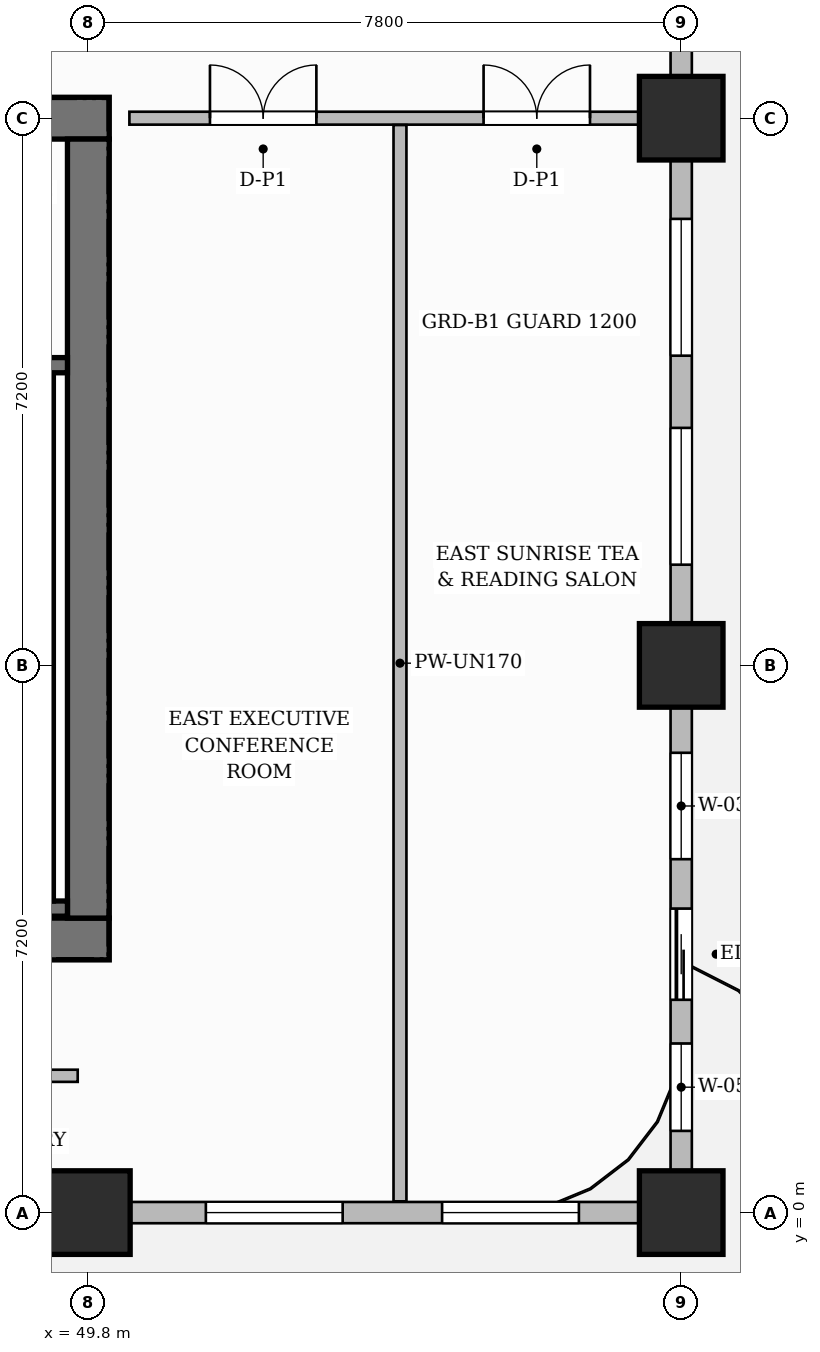
"""IFC4 building model, lengths in metres.
Left out: names, types, materials, properties, quantities, classifications, styles, units other than length and angle.
Written with IfcOpenShell. Run it as: python <this file> out.ifc"""

import sys

from ifc_helpers import new_model, si_unit, direction, frame, frame_2d, origin, origin_2d, place, context, subcontext, project, spatial, rectangle, extrude, source, transform, mapped, element, fill, save


model = new_model("IFC4")
c1 = context("Model", 3, precision=1e-05, world=origin(), true_north=direction((0.0, 1.0)))
c2 = subcontext(c1, "Body", "Model", "MODEL_VIEW")
j1 = project(units=[si_unit("LENGTHUNIT", "METRE"), si_unit("PLANEANGLEUNIT", "RADIAN")], contexts=[c1])
p1 = place(None, origin())
s1 = spatial("IfcSite", under=j1, at=p1, CompositionType="ELEMENT")
p2 = place(p1, origin())
s2 = spatial("IfcBuilding", under=s1, at=p2, CompositionType="ELEMENT")
p3 = place(p2, frame((0.0, 0.0, 65.7)))
s3 = spatial("IfcBuildingStorey", under=s2, at=p3, CompositionType="ELEMENT", Elevation=65.7)
p4 = place(p3, frame((34.525, 3.6, 0.0), z_axis=(0.0, 0.0, 1.0), x_axis=(1.0, 0.0, 0.0)))
e1 = element("IfcWall", 1, at=p4, inside=s3, PredefinedType="SHEAR", context=c2, shape_type="SweptSolid", body=[
    extrude(rectangle(XDim=15.55, YDim=0.55, at=frame_2d((7.775, 0.0))), origin(), (0.0, 0.0, 1.0), 3.7),
])
p5 = place(p4, frame((4.105, 0.0, 0.0)))
e2 = element("IfcOpeningElement", 2, at=p5, cuts=e1, PredefinedType="OPENING", context=c2, shape_type="SweptSolid", body=[
    extrude(rectangle(XDim=0.9, YDim=2.1, at=frame_2d((0.45, 1.05))), frame((0.0, 0.285, 0.0), z_axis=(0.0, -1.0, 0.0), x_axis=(1.0, 0.0, 0.0)), (0.0, 0.0, 1.0), 0.57),
])
p6 = place(p4, frame((5.675, 0.0, 0.0)))
e3 = element("IfcOpeningElement", 3, at=p6, cuts=e1, PredefinedType="OPENING", context=c2, shape_type="SweptSolid", body=[
    extrude(rectangle(XDim=0.9, YDim=2.1, at=frame_2d((0.45, 1.05))), frame((0.0, 0.285, 0.0), z_axis=(0.0, -1.0, 0.0), x_axis=(1.0, 0.0, 0.0)), (0.0, 0.0, 1.0), 0.57),
])
p7 = place(p4, frame((7.275, 0.0, 0.0)))
e4 = element("IfcOpeningElement", 4, at=p7, cuts=e1, PredefinedType="OPENING", context=c2, shape_type="SweptSolid", body=[
    extrude(rectangle(XDim=0.9, YDim=2.1, at=frame_2d((0.45, 1.05))), frame((0.0, 0.285, 0.0), z_axis=(0.0, -1.0, 0.0), x_axis=(1.0, 0.0, 0.0)), (0.0, 0.0, 1.0), 0.57),
])
p8 = place(p3, frame((34.525, 14.4, 0.0), z_axis=(0.0, 0.0, 1.0), x_axis=(1.0, 0.0, 0.0)))
e5 = element("IfcWall", 5, at=p8, inside=s3, PredefinedType="SHEAR", context=c2, shape_type="SweptSolid", body=[
    extrude(rectangle(XDim=15.55, YDim=0.55, at=frame_2d((7.775, 0.0))), origin(), (0.0, 0.0, 1.0), 3.7),
])
p9 = place(p8, frame((5.405, 0.0, 0.0)))
e6 = element("IfcOpeningElement", 6, at=p9, cuts=e5, PredefinedType="OPENING", context=c2, shape_type="SweptSolid", body=[
    extrude(rectangle(XDim=1.5, YDim=2.2, at=frame_2d((0.75, 1.1))), frame((0.0, 0.285, 0.0), z_axis=(0.0, -1.0, 0.0), x_axis=(1.0, 0.0, 0.0)), (0.0, 0.0, 1.0), 0.57),
])
p10 = place(p8, frame((1.62, 0.0, 0.0)))
e7 = element("IfcOpeningElement", 7, at=p10, cuts=e5, PredefinedType="OPENING", context=c2, shape_type="SweptSolid", body=[
    extrude(rectangle(XDim=1.05, YDim=2.15, at=frame_2d((0.525, 1.075))), frame((0.0, 0.285, 0.0), z_axis=(0.0, -1.0, 0.0), x_axis=(1.0, 0.0, 0.0)), (0.0, 0.0, 1.0), 0.57),
])
p11 = place(p8, frame((11.25, 0.0, 0.0)))
e8 = element("IfcOpeningElement", 8, at=p11, cuts=e5, PredefinedType="OPENING", context=c2, shape_type="SweptSolid", body=[
    extrude(rectangle(XDim=1.05, YDim=2.15, at=frame_2d((0.525, 1.075))), frame((0.0, 0.285, 0.0), z_axis=(0.0, -1.0, 0.0), x_axis=(1.0, 0.0, 0.0)), (0.0, 0.0, 1.0), 0.57),
])
p12 = place(p3, frame((49.8, 3.875, 0.0), z_axis=(0.0, 0.0, 1.0), x_axis=(0.0, 1.0, 0.0)))
e9 = element("IfcWall", 9, at=p12, inside=s3, PredefinedType="SHEAR", context=c2, shape_type="SweptSolid", body=[
    extrude(rectangle(XDim=10.25, YDim=0.55, at=frame_2d((5.125, 0.0))), origin(), (0.0, 0.0, 1.0), 3.7),
])
m1 = source(origin(), c2, "Body", "SweptSolid", [
    extrude(rectangle(XDim=1.1, YDim=1.1, at=origin_2d()), origin(), (0.0, 0.0, 1.0), 3.7),
])
for number, where, z_axis, x_axis in (
    (10, (49.8, 0.0, 0.0), (0.0, 0.0, 1.0), (1.0, 0.0, 0.0)),
    (11, (57.6, 0.0, 0.0), (0.0, 0.0, 1.0), (1.0, 0.0, 0.0)),
    (12, (57.6, 7.2, 0.0), (0.0, 0.0, 1.0), (1.0, 0.0, 0.0)),
    (13, (57.6, 14.4, 0.0), (0.0, 0.0, 1.0), (1.0, 0.0, 0.0)),
):
    element("IfcColumn", number, at=place(p3, frame(where, z_axis=z_axis, x_axis=x_axis)), inside=s3, PredefinedType="COLUMN", context=c2, shape_type="MappedRepresentation", body=[
        mapped(m1, transform((0.0, 0.0, 0.0), scale=1.0)),
    ])
p13 = place(p3, frame((43.12, 4.0, 0.0), z_axis=(0.0, 0.0, 1.0), x_axis=(1.0, 0.0, 0.0)))
e14 = element("IfcWall", 14, at=p13, inside=s3, PredefinedType="SHEAR", context=c2, shape_type="SweptSolid", body=[
    extrude(rectangle(XDim=6.405, YDim=0.2, at=frame_2d((3.202, 0.0))), origin(), (0.0, 0.0, 1.0), 3.7),
])
p14 = place(p3, frame((49.24, 4.1, 0.0), z_axis=(0.0, 0.0, 1.0), x_axis=(0.0, 1.0, 0.0)))
e15 = element("IfcWall", 15, at=p14, inside=s3, PredefinedType="SHEAR", context=c2, shape_type="SweptSolid", body=[
    extrude(rectangle(XDim=6.95, YDim=0.2, at=frame_2d((3.475, 0.0))), origin(), (0.0, 0.0, 1.0), 3.7),
])
p15 = place(p3, frame((43.12, 11.15, 0.0), z_axis=(0.0, 0.0, 1.0), x_axis=(1.0, 0.0, 0.0)))
e16 = element("IfcWall", 16, at=p15, inside=s3, PredefinedType="SHEAR", context=c2, shape_type="SweptSolid", body=[
    extrude(rectangle(XDim=6.405, YDim=0.2, at=frame_2d((3.202, 0.0))), origin(), (0.0, 0.0, 1.0), 3.7),
])
p16 = place(p15, frame((1.045, 0.0, 0.0)))
e17 = element("IfcOpeningElement", 17, at=p16, cuts=e16, PredefinedType="OPENING", context=c2, shape_type="SweptSolid", body=[
    extrude(rectangle(XDim=1.05, YDim=2.2, at=frame_2d((0.525, 1.1))), frame((0.0, 0.11, 0.0), z_axis=(0.0, -1.0, 0.0), x_axis=(1.0, 0.0, 0.0)), (0.0, 0.0, 1.0), 0.22),
])
p17 = place(p15, frame((4.125, 0.0, 0.0)))
e18 = element("IfcOpeningElement", 18, at=p17, cuts=e16, PredefinedType="OPENING", context=c2, shape_type="SweptSolid", body=[
    extrude(rectangle(XDim=1.05, YDim=2.2, at=frame_2d((0.525, 1.1))), frame((0.0, 0.11, 0.0), z_axis=(0.0, -1.0, 0.0), x_axis=(1.0, 0.0, 0.0)), (0.0, 0.0, 1.0), 0.22),
])
p18 = place(p3, frame((30.29, 1.8, 0.0), z_axis=(0.0, 0.0, 1.0), x_axis=(1.0, 0.0, 0.0)))
e19 = element("IfcWall", 19, at=p18, inside=s3, PredefinedType="PARTITIONING", context=c2, shape_type="SweptSolid", body=[
    extrude(rectangle(XDim=19.37, YDim=0.16, at=frame_2d((9.685, 0.0))), origin(), (0.0, 0.0, 1.0), 3.45),
])
p19 = place(p18, frame((5.213, 0.0, 0.0)))
e20 = element("IfcOpeningElement", 20, at=p19, cuts=e19, PredefinedType="OPENING", context=c2, shape_type="SweptSolid", body=[
    extrude(rectangle(XDim=0.9, YDim=2.15, at=frame_2d((0.45, 1.075))), frame((0.0, 0.09, 0.0), z_axis=(0.0, -1.0, 0.0), x_axis=(1.0, 0.0, 0.0)), (0.0, 0.0, 1.0), 0.18),
])
p20 = place(p18, frame((14.06, 0.0, 0.0)))
e21 = element("IfcOpeningElement", 21, at=p20, cuts=e19, PredefinedType="OPENING", context=c2, shape_type="SweptSolid", body=[
    extrude(rectangle(XDim=0.9, YDim=2.15, at=frame_2d((0.45, 1.075))), frame((0.0, 0.09, 0.0), z_axis=(0.0, -1.0, 0.0), x_axis=(1.0, 0.0, 0.0)), (0.0, 0.0, 1.0), 0.18),
])
p21 = place(p3, frame((50.34, 14.4, 0.0), z_axis=(0.0, 0.0, 1.0), x_axis=(1.0, 0.0, 0.0)))
e22 = element("IfcWall", 22, at=p21, inside=s3, PredefinedType="PARTITIONING", context=c2, shape_type="SweptSolid", body=[
    extrude(rectangle(XDim=7.07, YDim=0.17, at=frame_2d((3.535, 0.0))), origin(), (0.0, 0.0, 1.0), 2.885),
])
p22 = place(p21, frame((1.06, 0.0, 0.0)))
e23 = element("IfcOpeningElement", 23, at=p22, cuts=e22, PredefinedType="OPENING", context=c2, shape_type="SweptSolid", body=[
    extrude(rectangle(XDim=1.4, YDim=2.35, at=frame_2d((0.7, 1.175))), frame((0.0, 0.095, 0.0), z_axis=(0.0, -1.0, 0.0), x_axis=(1.0, 0.0, 0.0)), (0.0, 0.0, 1.0), 0.19),
])
p23 = place(p21, frame((4.66, 0.0, 0.0)))
e24 = element("IfcOpeningElement", 24, at=p23, cuts=e22, PredefinedType="OPENING", context=c2, shape_type="SweptSolid", body=[
    extrude(rectangle(XDim=1.4, YDim=2.35, at=frame_2d((0.7, 1.175))), frame((0.0, 0.095, 0.0), z_axis=(0.0, -1.0, 0.0), x_axis=(1.0, 0.0, 0.0)), (0.0, 0.0, 1.0), 0.19),
])
p24 = place(p3, frame((53.9, 0.148, 0.0), z_axis=(0.0, 0.0, 1.0), x_axis=(0.0, 1.0, 0.0)))
e25 = element("IfcWall", 25, at=p24, inside=s3, PredefinedType="PARTITIONING", context=c2, shape_type="SweptSolid", body=[
    extrude(rectangle(XDim=14.162, YDim=0.17, at=frame_2d((7.081, 0.0))), origin(), (0.0, 0.0, 1.0), 3.035),
])
p25 = place(p3, frame((14.4, 0.0, 0.0), z_axis=(0.0, 0.0, 1.0), x_axis=(1.0, 0.0, 0.0)))
e26 = element("IfcWall", 26, at=p25, inside=s3, PredefinedType="SOLIDWALL", context=c2, shape_type="SweptSolid", body=[
    extrude(rectangle(XDim=43.2, YDim=0.28, at=frame_2d((21.6, 0.0))), origin(), (0.0, 0.0, 1.0), 2.885),
])
p26 = place(p25, frame((0.85, 0.0, 0.0)))
e27 = element("IfcOpeningElement", 27, at=p26, cuts=e26, PredefinedType="OPENING", context=c2, shape_type="SweptSolid", body=[
    extrude(rectangle(XDim=1.2, YDim=2.2, at=frame_2d((0.6, 1.1))), frame((0.0, 0.15, 0.0), z_axis=(0.0, -1.0, 0.0), x_axis=(1.0, 0.0, 0.0)), (0.0, 0.0, 1.0), 0.3),
])
p27 = place(p25, frame((2.671, 0.0, 0.8)))
e28 = element("IfcOpeningElement", 28, at=p27, cuts=e26, PredefinedType="OPENING", context=c2, shape_type="SweptSolid", body=[
    extrude(rectangle(XDim=0.95, YDim=1.75, at=frame_2d((0.475, 0.875))), frame((0.0, 0.15, 0.0), z_axis=(0.0, -1.0, 0.0), x_axis=(1.0, 0.0, 0.0)), (0.0, 0.0, 1.0), 0.3),
])
p28 = place(p25, frame((4.479, 0.0, 0.8)))
e29 = element("IfcOpeningElement", 29, at=p28, cuts=e26, PredefinedType="OPENING", context=c2, shape_type="SweptSolid", body=[
    extrude(rectangle(XDim=1.4, YDim=1.85, at=frame_2d((0.7, 0.925))), frame((0.0, 0.15, 0.0), z_axis=(0.0, -1.0, 0.0), x_axis=(1.0, 0.0, 0.0)), (0.0, 0.0, 1.0), 0.3),
])
p29 = place(p25, frame((8.181, 0.0, 0.8)))
e30 = element("IfcOpeningElement", 30, at=p29, cuts=e26, PredefinedType="OPENING", context=c2, shape_type="SweptSolid", body=[
    extrude(rectangle(XDim=0.95, YDim=1.75, at=frame_2d((0.475, 0.875))), frame((0.0, 0.15, 0.0), z_axis=(0.0, -1.0, 0.0), x_axis=(1.0, 0.0, 0.0)), (0.0, 0.0, 1.0), 0.3),
])
p30 = place(p25, frame((9.845, 0.0, 0.8)))
e31 = element("IfcOpeningElement", 31, at=p30, cuts=e26, PredefinedType="OPENING", context=c2, shape_type="SweptSolid", body=[
    extrude(rectangle(XDim=1.8, YDim=1.85, at=frame_2d((0.9, 0.925))), frame((0.0, 0.15, 0.0), z_axis=(0.0, -1.0, 0.0), x_axis=(1.0, 0.0, 0.0)), (0.0, 0.0, 1.0), 0.3),
])
p31 = place(p25, frame((12.414, 0.0, 0.8)))
e32 = element("IfcOpeningElement", 32, at=p31, cuts=e26, PredefinedType="OPENING", context=c2, shape_type="SweptSolid", body=[
    extrude(rectangle(XDim=0.95, YDim=1.75, at=frame_2d((0.475, 0.875))), frame((0.0, 0.15, 0.0), z_axis=(0.0, -1.0, 0.0), x_axis=(1.0, 0.0, 0.0)), (0.0, 0.0, 1.0), 0.3),
])
p32 = place(p25, frame((16.804, 0.0, 0.8)))
e33 = element("IfcOpeningElement", 33, at=p32, cuts=e26, PredefinedType="OPENING", context=c2, shape_type="SweptSolid", body=[
    extrude(rectangle(XDim=1.8, YDim=1.85, at=frame_2d((0.9, 0.925))), frame((0.0, 0.15, 0.0), z_axis=(0.0, -1.0, 0.0), x_axis=(1.0, 0.0, 0.0)), (0.0, 0.0, 1.0), 0.3),
])
p33 = place(p25, frame((22.396, 0.0, 0.8)))
e34 = element("IfcOpeningElement", 34, at=p33, cuts=e26, PredefinedType="OPENING", context=c2, shape_type="SweptSolid", body=[
    extrude(rectangle(XDim=1.8, YDim=1.85, at=frame_2d((0.9, 0.925))), frame((0.0, 0.15, 0.0), z_axis=(0.0, -1.0, 0.0), x_axis=(1.0, 0.0, 0.0)), (0.0, 0.0, 1.0), 0.3),
])
p34 = place(p25, frame((25.629, 0.0, 0.8)))
e35 = element("IfcOpeningElement", 35, at=p34, cuts=e26, PredefinedType="OPENING", context=c2, shape_type="SweptSolid", body=[
    extrude(rectangle(XDim=0.95, YDim=1.75, at=frame_2d((0.475, 0.875))), frame((0.0, 0.15, 0.0), z_axis=(0.0, -1.0, 0.0), x_axis=(1.0, 0.0, 0.0)), (0.0, 0.0, 1.0), 0.3),
])
p35 = place(p25, frame((29.075, 0.0, 0.8)))
e36 = element("IfcOpeningElement", 36, at=p35, cuts=e26, PredefinedType="OPENING", context=c2, shape_type="SweptSolid", body=[
    extrude(rectangle(XDim=1.8, YDim=1.85, at=frame_2d((0.9, 0.925))), frame((0.0, 0.15, 0.0), z_axis=(0.0, -1.0, 0.0), x_axis=(1.0, 0.0, 0.0)), (0.0, 0.0, 1.0), 0.3),
])
p36 = place(p25, frame((32.125, 0.0, 0.8)))
e37 = element("IfcOpeningElement", 37, at=p36, cuts=e26, PredefinedType="OPENING", context=c2, shape_type="SweptSolid", body=[
    extrude(rectangle(XDim=1.8, YDim=1.85, at=frame_2d((0.9, 0.925))), frame((0.0, 0.15, 0.0), z_axis=(0.0, -1.0, 0.0), x_axis=(1.0, 0.0, 0.0)), (0.0, 0.0, 1.0), 0.3),
])
p37 = place(p25, frame((36.946, 0.0, 0.8)))
e38 = element("IfcOpeningElement", 38, at=p37, cuts=e26, PredefinedType="OPENING", context=c2, shape_type="SweptSolid", body=[
    extrude(rectangle(XDim=1.8, YDim=1.85, at=frame_2d((0.9, 0.925))), frame((0.0, 0.15, 0.0), z_axis=(0.0, -1.0, 0.0), x_axis=(1.0, 0.0, 0.0)), (0.0, 0.0, 1.0), 0.3),
])
p38 = place(p25, frame((40.054, 0.0, 0.8)))
e39 = element("IfcOpeningElement", 39, at=p38, cuts=e26, PredefinedType="OPENING", context=c2, shape_type="SweptSolid", body=[
    extrude(rectangle(XDim=1.8, YDim=1.85, at=frame_2d((0.9, 0.925))), frame((0.0, 0.15, 0.0), z_axis=(0.0, -1.0, 0.0), x_axis=(1.0, 0.0, 0.0)), (0.0, 0.0, 1.0), 0.3),
])
p39 = place(p3, frame((57.6, 0.05, 0.0), z_axis=(0.0, 0.0, 1.0), x_axis=(0.0, 1.0, 0.0)))
e40 = element("IfcWall", 40, at=p39, inside=s3, PredefinedType="SOLIDWALL", context=c2, shape_type="SweptSolid", body=[
    extrude(rectangle(XDim=21.5, YDim=0.28, at=frame_2d((10.75, 0.0))), origin(), (0.0, 0.0, 1.0), 2.885),
])
p40 = place(p39, frame((2.75, 0.0, 0.0)))
e41 = element("IfcOpeningElement", 41, at=p40, cuts=e40, PredefinedType="OPENING", context=c2, shape_type="SweptSolid", body=[
    extrude(rectangle(XDim=1.2, YDim=2.2, at=frame_2d((0.6, 1.1))), frame((0.0, 0.15, 0.0), z_axis=(0.0, -1.0, 0.0), x_axis=(1.0, 0.0, 0.0)), (0.0, 0.0, 1.0), 0.3),
])
p41 = place(p39, frame((1.025, 0.0, 0.8)))
e42 = element("IfcOpeningElement", 42, at=p41, cuts=e40, PredefinedType="OPENING", context=c2, shape_type="SweptSolid", body=[
    extrude(rectangle(XDim=1.15, YDim=1.8, at=frame_2d((0.575, 0.9))), frame((0.0, 0.15, 0.0), z_axis=(0.0, -1.0, 0.0), x_axis=(1.0, 0.0, 0.0)), (0.0, 0.0, 1.0), 0.3),
])
p42 = place(p39, frame((4.6, 0.0, 0.8)))
e43 = element("IfcOpeningElement", 43, at=p42, cuts=e40, PredefinedType="OPENING", context=c2, shape_type="SweptSolid", body=[
    extrude(rectangle(XDim=1.4, YDim=1.85, at=frame_2d((0.7, 0.925))), frame((0.0, 0.15, 0.0), z_axis=(0.0, -1.0, 0.0), x_axis=(1.0, 0.0, 0.0)), (0.0, 0.0, 1.0), 0.3),
])
p43 = place(p39, frame((8.475, 0.0, 0.8)))
e44 = element("IfcOpeningElement", 44, at=p43, cuts=e40, PredefinedType="OPENING", context=c2, shape_type="SweptSolid", body=[
    extrude(rectangle(XDim=1.8, YDim=1.85, at=frame_2d((0.9, 0.925))), frame((0.0, 0.15, 0.0), z_axis=(0.0, -1.0, 0.0), x_axis=(1.0, 0.0, 0.0)), (0.0, 0.0, 1.0), 0.3),
])
p44 = place(p39, frame((11.225, 0.0, 0.8)))
e45 = element("IfcOpeningElement", 45, at=p44, cuts=e40, PredefinedType="OPENING", context=c2, shape_type="SweptSolid", body=[
    extrude(rectangle(XDim=1.8, YDim=1.85, at=frame_2d((0.9, 0.925))), frame((0.0, 0.15, 0.0), z_axis=(0.0, -1.0, 0.0), x_axis=(1.0, 0.0, 0.0)), (0.0, 0.0, 1.0), 0.3),
])
p45 = place(p39, frame((15.471, 0.0, 0.8)))
e46 = element("IfcOpeningElement", 46, at=p45, cuts=e40, PredefinedType="OPENING", context=c2, shape_type="SweptSolid", body=[
    extrude(rectangle(XDim=1.15, YDim=1.8, at=frame_2d((0.575, 0.9))), frame((0.0, 0.15, 0.0), z_axis=(0.0, -1.0, 0.0), x_axis=(1.0, 0.0, 0.0)), (0.0, 0.0, 1.0), 0.3),
])
p46 = place(p39, frame((17.954, 0.0, 0.8)))
e47 = element("IfcOpeningElement", 47, at=p46, cuts=e40, PredefinedType="OPENING", context=c2, shape_type="SweptSolid", body=[
    extrude(rectangle(XDim=1.8, YDim=1.85, at=frame_2d((0.9, 0.925))), frame((0.0, 0.15, 0.0), z_axis=(0.0, -1.0, 0.0), x_axis=(1.0, 0.0, 0.0)), (0.0, 0.0, 1.0), 0.3),
])
m2 = source(origin(), c2, "Body", "SweptSolid", [
    extrude(rectangle(XDim=1.4, YDim=2.35, at=frame_2d((0.7, 1.175))), frame((0.0, 0.025, 0.0), z_axis=(0.0, -1.0, 0.0), x_axis=(1.0, 0.0, 0.0)), (0.0, 0.0, 1.0), 0.05),
])
p47 = place(p22, origin())
e48 = element("IfcDoor", 48, at=p47, inside=s3, OperationType="DOUBLE_DOOR_SINGLE_SWING", PredefinedType="DOOR", context=c2, shape_type="MappedRepresentation", body=[
    mapped(m2, transform((0.0, 0.0, 0.0), scale=1.0)),
])
fill(e23, e48)
p48 = place(p23, origin())
e49 = element("IfcDoor", 49, at=p48, inside=s3, OperationType="DOUBLE_DOOR_SINGLE_SWING", PredefinedType="DOOR", context=c2, shape_type="MappedRepresentation", body=[
    mapped(m2, transform((0.0, 0.0, 0.0), scale=1.0)),
])
fill(e24, e49)
m3 = source(origin(), c2, "Body", "SweptSolid", [
    extrude(rectangle(XDim=1.2, YDim=2.2, at=frame_2d((0.6, 1.1))), frame((0.0, 0.025, 0.0), z_axis=(0.0, -1.0, 0.0), x_axis=(1.0, 0.0, 0.0)), (0.0, 0.0, 1.0), 0.05),
])
p49 = place(p40, origin())
e50 = element("IfcDoor", 50, at=p49, inside=s3, OperationType="SLIDING_TO_LEFT", PredefinedType="DOOR", context=c2, shape_type="MappedRepresentation", body=[
    mapped(m3, transform((0.0, 0.0, 0.0), scale=1.0)),
])
fill(e41, e50)
m4 = source(origin(), c2, "Body", "SweptSolid", [
    extrude(rectangle(XDim=1.8, YDim=1.85, at=frame_2d((0.9, 0.925))), frame((0.0, 0.03, 0.0), z_axis=(0.0, -1.0, 0.0), x_axis=(1.0, 0.0, 0.0)), (0.0, 0.0, 1.0), 0.06),
])
p50 = place(p37, origin())
e51 = element("IfcWindow", 51, at=p50, inside=s3, PartitioningType="DOUBLE_PANEL_VERTICAL", PredefinedType="WINDOW", context=c2, shape_type="MappedRepresentation", body=[
    mapped(m4, transform((0.0, 0.0, 0.0), scale=1.0)),
])
fill(e38, e51)
p51 = place(p38, origin())
e52 = element("IfcWindow", 52, at=p51, inside=s3, PartitioningType="DOUBLE_PANEL_VERTICAL", PredefinedType="WINDOW", context=c2, shape_type="MappedRepresentation", body=[
    mapped(m4, transform((0.0, 0.0, 0.0), scale=1.0)),
])
fill(e39, e52)
m5 = source(origin(), c2, "Body", "SweptSolid", [
    extrude(rectangle(XDim=1.15, YDim=1.8, at=frame_2d((0.575, 0.9))), frame((0.0, 0.03, 0.0), z_axis=(0.0, -1.0, 0.0), x_axis=(1.0, 0.0, 0.0)), (0.0, 0.0, 1.0), 0.06),
])
p52 = place(p41, origin())
e53 = element("IfcWindow", 53, at=p52, inside=s3, PartitioningType="SINGLE_PANEL", PredefinedType="WINDOW", context=c2, shape_type="MappedRepresentation", body=[
    mapped(m5, transform((0.0, 0.0, 0.0), scale=1.0)),
])
fill(e42, e53)
m6 = source(origin(), c2, "Body", "SweptSolid", [
    extrude(rectangle(XDim=1.4, YDim=1.85, at=frame_2d((0.7, 0.925))), frame((0.0, 0.03, 0.0), z_axis=(0.0, -1.0, 0.0), x_axis=(1.0, 0.0, 0.0)), (0.0, 0.0, 1.0), 0.06),
])
p53 = place(p42, origin())
e54 = element("IfcWindow", 54, at=p53, inside=s3, PartitioningType="SINGLE_PANEL", PredefinedType="WINDOW", context=c2, shape_type="MappedRepresentation", body=[
    mapped(m6, transform((0.0, 0.0, 0.0), scale=1.0)),
])
fill(e43, e54)
p54 = place(p43, origin())
e55 = element("IfcWindow", 55, at=p54, inside=s3, PartitioningType="DOUBLE_PANEL_VERTICAL", PredefinedType="WINDOW", context=c2, shape_type="MappedRepresentation", body=[
    mapped(m4, transform((0.0, 0.0, 0.0), scale=1.0)),
])
fill(e44, e55)
p55 = place(p44, origin())
e56 = element("IfcWindow", 56, at=p55, inside=s3, PartitioningType="DOUBLE_PANEL_VERTICAL", PredefinedType="WINDOW", context=c2, shape_type="MappedRepresentation", body=[
    mapped(m4, transform((0.0, 0.0, 0.0), scale=1.0)),
])
fill(e45, e56)
save(model, sys.argv[1])
